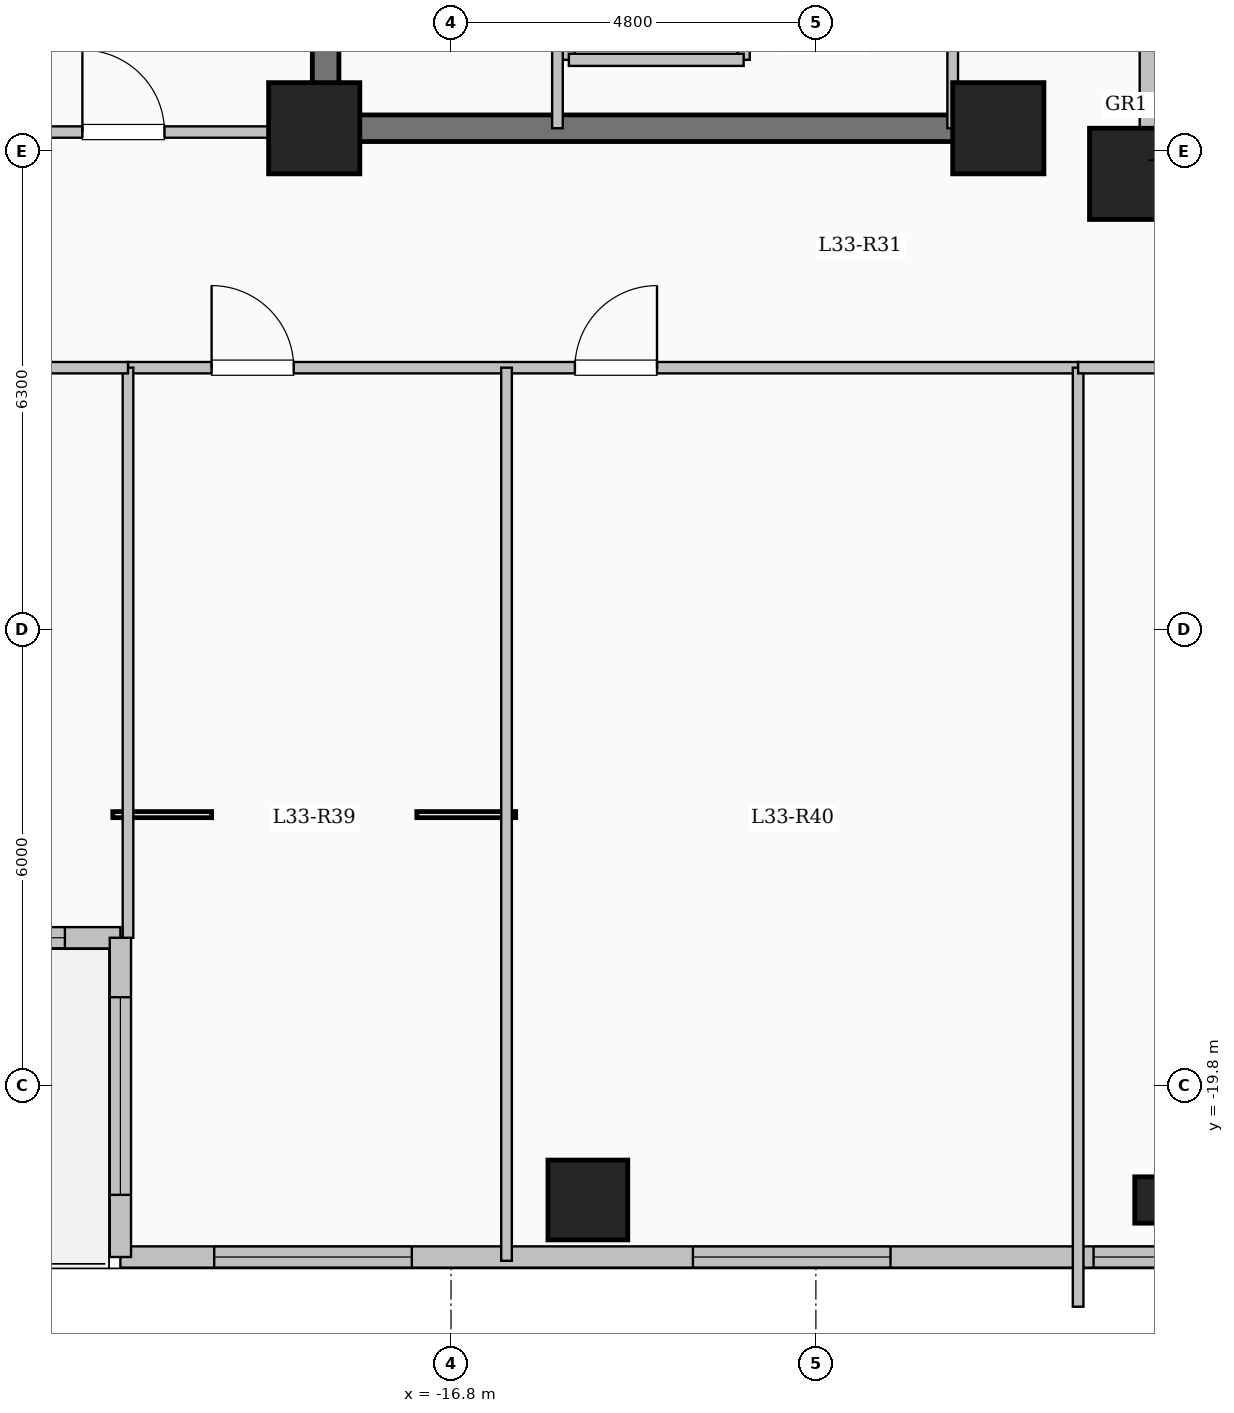
"""IFC4 building model, lengths in metres.
Left out: names, types, materials, properties, quantities, classifications, styles, units other than length and angle.
Written with IfcOpenShell. Run it as: python <this file> out.ifc"""

import sys

from ifc_helpers import new_model, si_unit, direction, frame, frame_2d, origin, origin_2d, place, context, subcontext, project, spatial, rectangle, hollow_circle, extrude, element, fill, save


model = new_model("IFC4")
c1 = context("Model", 3, precision=1e-05, world=origin(), true_north=direction((0.0, 1.0)))
c2 = subcontext(c1, "Body", "Model", "MODEL_VIEW")
j1 = project(units=[si_unit("LENGTHUNIT", "METRE"), si_unit("PLANEANGLEUNIT", "RADIAN")], contexts=[c1])
p1 = place(None, origin())
s1 = spatial("IfcSite", under=j1, at=p1, CompositionType="ELEMENT")
p2 = place(p1, origin())
s2 = spatial("IfcBuilding", under=s1, at=p2, CompositionType="ELEMENT")
p3 = place(p2, frame((0.0, 0.0, 123.0)))
s3 = spatial("IfcBuildingStorey", under=s2, at=p3, CompositionType="ELEMENT", Elevation=123.0)
for number, where, z_axis, x_axis in (
    (1, (-7.8, -7.8, 0.0), (0.0, 0.0, 1.0), (1.0, 0.0, 0.0)),
    (2, (-9.6, -7.2, 0.0), (0.0, 0.0, 1.0), (1.0, 0.0, 0.0)),
    (3, (-18.6, -7.2, 0.0), (0.0, 0.0, 1.0), (1.0, 0.0, 0.0)),
):
    element("IfcColumn", number, at=place(p3, frame(where, z_axis=z_axis, x_axis=x_axis)), inside=s3, PredefinedType="COLUMN", context=c2, shape_type="SweptSolid", body=[
        extrude(rectangle(XDim=1.2, YDim=1.2, at=origin_2d()), origin(), (0.0, 0.0, 1.0), 4.5),
    ])
p4 = place(p3, frame((-15.0, -21.3, 0.0), z_axis=(0.0, 0.0, 1.0), x_axis=(1.0, 0.0, 0.0)))
e4 = element("IfcColumn", 4, at=p4, inside=s3, PredefinedType="COLUMN", context=c2, shape_type="SweptSolid", body=[
    extrude(rectangle(XDim=1.05, YDim=1.05, at=origin_2d()), origin(), (0.0, 0.0, 1.0), 4.5),
])
p5 = place(p3, frame((-7.5, -21.3, 0.0), z_axis=(0.0, 0.0, 1.0), x_axis=(1.0, 0.0, 0.0)))
e5 = element("IfcColumn", 5, at=p5, inside=s3, PredefinedType="COLUMN", context=c2, shape_type="SweptSolid", body=[
    extrude(hollow_circle(Radius=0.305, WallThickness=0.025, at=origin_2d()), origin(), (0.0, 0.0, 1.0), 4.5),
])
p6 = place(p3, frame((-7.62, 7.62, 0.0), z_axis=(0.0, 0.0, 1.0), x_axis=(0.0, -1.0, 0.0)))
e6 = element("IfcWall", 6, at=p6, inside=s3, PredefinedType="SOLIDWALL", context=c2, shape_type="SweptSolid", body=[
    extrude(rectangle(XDim=15.24, YDim=0.24, at=frame_2d((7.62, 0.0))), origin(), (0.0, 0.0, 1.0), 4.2),
])
p7 = place(p6, frame((6.92, 0.0, 0.95)))
e7 = element("IfcOpeningElement", 7, at=p7, cuts=e6, PredefinedType="OPENING", context=c2, shape_type="SweptSolid", body=[
    extrude(rectangle(XDim=1.4, YDim=1.5, at=frame_2d((0.7, 0.75))), frame((0.0, 0.13, 0.0), z_axis=(0.0, -1.0, 0.0), x_axis=(1.0, 0.0, 0.0)), (0.0, 0.0, 1.0), 0.26),
])
p8 = place(p3, frame((-21.15, -17.85, 0.0), z_axis=(0.0, 0.0, 1.0), x_axis=(-1.0, 0.0, 0.0)))
e8 = element("IfcWall", 8, at=p8, inside=s3, PredefinedType="SOLIDWALL", context=c2, shape_type="SweptSolid", body=[
    extrude(rectangle(XDim=5.7, YDim=0.28, at=frame_2d((2.85, 0.0))), origin(), (0.0, 0.0, 1.0), 4.2),
])
p9 = place(p8, frame((2.5, 0.0, 0.0)))
e9 = element("IfcOpeningElement", 9, at=p9, cuts=e8, PredefinedType="OPENING", context=c2, shape_type="SweptSolid", body=[
    extrude(rectangle(XDim=1.1, YDim=2.2, at=frame_2d((0.55, 1.1))), frame((0.0, 0.15, 0.0), z_axis=(0.0, -1.0, 0.0), x_axis=(1.0, 0.0, 0.0)), (0.0, 0.0, 1.0), 0.3),
])
p10 = place(p8, frame((0.73, 0.0, 0.95)))
e10 = element("IfcOpeningElement", 10, at=p10, cuts=e8, PredefinedType="OPENING", context=c2, shape_type="SweptSolid", body=[
    extrude(rectangle(XDim=1.2, YDim=1.5, at=frame_2d((0.6, 0.75))), frame((0.0, 0.15, 0.0), z_axis=(0.0, -1.0, 0.0), x_axis=(1.0, 0.0, 0.0)), (0.0, 0.0, 1.0), 0.3),
])
p11 = place(p3, frame((-7.35, -22.05, 0.0), z_axis=(0.0, 0.0, 1.0), x_axis=(-1.0, 0.0, 0.0)))
e11 = element("IfcWall", 11, at=p11, inside=s3, PredefinedType="SOLIDWALL", context=c2, shape_type="SweptSolid", body=[
    extrude(rectangle(XDim=13.8, YDim=0.28, at=frame_2d((6.9, 0.0))), origin(), (0.0, 0.0, 1.0), 4.2),
])
p12 = place(p11, frame((0.147, 0.0, 0.95)))
e12 = element("IfcOpeningElement", 12, at=p12, cuts=e11, PredefinedType="OPENING", context=c2, shape_type="SweptSolid", body=[
    extrude(rectangle(XDim=0.85, YDim=1.5, at=frame_2d((0.425, 0.75))), frame((0.0, 0.15, 0.0), z_axis=(0.0, -1.0, 0.0), x_axis=(1.0, 0.0, 0.0)), (0.0, 0.0, 1.0), 0.3),
])
p13 = place(p11, frame((3.668, 0.0, 0.85)))
e13 = element("IfcOpeningElement", 13, at=p13, cuts=e11, PredefinedType="OPENING", context=c2, shape_type="SweptSolid", body=[
    extrude(rectangle(XDim=2.6, YDim=2.4, at=frame_2d((1.3, 1.2))), frame((0.0, 0.15, 0.0), z_axis=(0.0, -1.0, 0.0), x_axis=(1.0, 0.0, 0.0)), (0.0, 0.0, 1.0), 0.3),
])
p14 = place(p11, frame((9.966, 0.0, 0.85)))
e14 = element("IfcOpeningElement", 14, at=p14, cuts=e11, PredefinedType="OPENING", context=c2, shape_type="SweptSolid", body=[
    extrude(rectangle(XDim=2.6, YDim=2.4, at=frame_2d((1.3, 1.2))), frame((0.0, 0.15, 0.0), z_axis=(0.0, -1.0, 0.0), x_axis=(1.0, 0.0, 0.0)), (0.0, 0.0, 1.0), 0.3),
])
p15 = place(p3, frame((-21.15, -22.05, 0.0), z_axis=(0.0, 0.0, 1.0), x_axis=(0.0, 1.0, 0.0)))
e15 = element("IfcWall", 15, at=p15, inside=s3, PredefinedType="SOLIDWALL", context=c2, shape_type="SweptSolid", body=[
    extrude(rectangle(XDim=4.2, YDim=0.28, at=frame_2d((2.1, 0.0))), origin(), (0.0, 0.0, 1.0), 4.2),
])
p16 = place(p15, frame((0.818, 0.0, 0.85)))
e16 = element("IfcOpeningElement", 16, at=p16, cuts=e15, PredefinedType="OPENING", context=c2, shape_type="SweptSolid", body=[
    extrude(rectangle(XDim=2.6, YDim=2.4, at=frame_2d((1.3, 1.2))), frame((0.0, 0.15, 0.0), z_axis=(0.0, -1.0, 0.0), x_axis=(1.0, 0.0, 0.0)), (0.0, 0.0, 1.0), 0.3),
])
for number, where, z_axis, x_axis in (
    (17, (-15.25, -6.3, 0.0), (0.0, 0.0, 1.0), (0.0, 1.0, 0.0)),
    (18, (-12.95, -6.3, 0.0), (0.0, 0.0, 1.0), (0.0, 1.0, 0.0)),
):
    element("IfcWall", number, at=place(p3, frame(where, z_axis=z_axis, x_axis=x_axis)), inside=s3, PredefinedType="SOLIDWALL", context=c2, shape_type="SweptSolid", body=[
        extrude(rectangle(XDim=2.6, YDim=0.16, at=frame_2d((1.3, 0.0))), origin(), (0.0, 0.0, 1.0), 4.2),
    ])
p17 = place(p3, frame((-15.25, -6.3, 0.0), z_axis=(0.0, 0.0, 1.0), x_axis=(1.0, 0.0, 0.0)))
e19 = element("IfcWall", 19, at=p17, inside=s3, PredefinedType="SOLIDWALL", context=c2, shape_type="SweptSolid", body=[
    extrude(rectangle(XDim=2.3, YDim=0.16, at=frame_2d((1.15, 0.0))), origin(), (0.0, 0.0, 1.0), 4.2),
])
p18 = place(p3, frame((-18.45, -7.375, 0.0), z_axis=(0.0, 0.0, 1.0), x_axis=(0.0, 1.0, 0.0)))
e20 = element("IfcWall", 20, at=p18, inside=s3, PredefinedType="SHEAR", context=c2, shape_type="SweptSolid", body=[
    extrude(rectangle(XDim=14.05, YDim=0.35, at=frame_2d((7.025, 0.0))), origin(), (0.0, 0.0, 1.0), 4.5),
])
p19 = place(p3, frame((-18.625, -7.2, 0.0), z_axis=(0.0, 0.0, 1.0), x_axis=(1.0, 0.0, 0.0)))
e21 = element("IfcWall", 21, at=p19, inside=s3, PredefinedType="SHEAR", context=c2, shape_type="SweptSolid", body=[
    extrude(rectangle(XDim=8.55, YDim=0.35, at=frame_2d((4.275, 0.0))), origin(), (0.0, 0.0, 1.0), 4.5),
])
p20 = place(p3, frame((-15.4, -7.2, 0.0), z_axis=(0.0, 0.0, 1.0), x_axis=(0.0, 1.0, 0.0)))
e22 = element("IfcWall", 22, at=p20, inside=s3, PredefinedType="PARTITIONING", context=c2, shape_type="SweptSolid", body=[
    extrude(rectangle(XDim=10.45, YDim=0.14, at=frame_2d((5.225, 0.0))), origin(), (0.0, 0.0, 1.0), 4.2),
])
p21 = place(p20, frame((9.25, 0.0, 0.0)))
e23 = element("IfcOpeningElement", 23, at=p21, cuts=e22, PredefinedType="OPENING", context=c2, shape_type="SweptSolid", body=[
    extrude(rectangle(XDim=0.9, YDim=2.08, at=frame_2d((0.45, 1.04))), frame((0.0, 0.08, 0.0), z_axis=(0.0, -1.0, 0.0), x_axis=(1.0, 0.0, 0.0)), (0.0, 0.0, 1.0), 0.16),
])
p22 = place(p3, frame((-10.2, -7.2, 0.0), z_axis=(0.0, 0.0, 1.0), x_axis=(0.0, 1.0, 0.0)))
e24 = element("IfcWall", 24, at=p22, inside=s3, PredefinedType="PARTITIONING", context=c2, shape_type="SweptSolid", body=[
    extrude(rectangle(XDim=9.12, YDim=0.14, at=frame_2d((4.56, 0.0))), origin(), (0.0, 0.0, 1.0), 4.2),
])
p23 = place(p22, frame((1.9, 0.0, 0.0)))
e25 = element("IfcOpeningElement", 25, at=p23, cuts=e24, PredefinedType="OPENING", context=c2, shape_type="SweptSolid", body=[
    extrude(rectangle(XDim=0.95, YDim=2.12, at=frame_2d((0.475, 1.06))), frame((0.0, 0.08, 0.0), z_axis=(0.0, -1.0, 0.0), x_axis=(1.0, 0.0, 0.0)), (0.0, 0.0, 1.0), 0.16),
])
p24 = place(p22, frame((5.0, 0.0, 0.0)))
e26 = element("IfcOpeningElement", 26, at=p24, cuts=e24, PredefinedType="OPENING", context=c2, shape_type="SweptSolid", body=[
    extrude(rectangle(XDim=0.95, YDim=2.12, at=frame_2d((0.475, 1.06))), frame((0.0, 0.08, 0.0), z_axis=(0.0, -1.0, 0.0), x_axis=(1.0, 0.0, 0.0)), (0.0, 0.0, 1.0), 0.16),
])
p25 = place(p3, frame((-21.05, -10.35, 0.0), z_axis=(0.0, 0.0, 1.0), x_axis=(1.0, 0.0, 0.0)))
e27 = element("IfcWall", 27, at=p25, inside=s3, PredefinedType="PARTITIONING", context=c2, shape_type="SweptSolid", body=[
    extrude(rectangle(XDim=12.5, YDim=0.15, at=frame_2d((6.25, 0.0))), origin(), (0.0, 0.0, 1.0), 4.2),
])
p26 = place(p25, frame((1.1, 0.0, 0.0)))
e28 = element("IfcOpeningElement", 28, at=p26, cuts=e27, PredefinedType="OPENING", context=c2, shape_type="SweptSolid", body=[
    extrude(rectangle(XDim=1.08, YDim=2.15, at=frame_2d((0.54, 1.075))), frame((0.0, 0.085, 0.0), z_axis=(0.0, -1.0, 0.0), x_axis=(1.0, 0.0, 0.0)), (0.0, 0.0, 1.0), 0.17),
])
p27 = place(p25, frame((5.88, 0.0, 0.0)))
e29 = element("IfcOpeningElement", 29, at=p27, cuts=e27, PredefinedType="OPENING", context=c2, shape_type="SweptSolid", body=[
    extrude(rectangle(XDim=1.08, YDim=2.15, at=frame_2d((0.54, 1.075))), frame((0.0, 0.085, 0.0), z_axis=(0.0, -1.0, 0.0), x_axis=(1.0, 0.0, 0.0)), (0.0, 0.0, 1.0), 0.17),
])
p28 = place(p3, frame((-16.07, -22.1, 0.0), z_axis=(0.0, 0.0, 1.0), x_axis=(0.0, 1.0, 0.0)))
e30 = element("IfcWall", 30, at=p28, inside=s3, PredefinedType="PARTITIONING", context=c2, shape_type="SweptSolid", body=[
    extrude(rectangle(XDim=11.75, YDim=0.14, at=frame_2d((5.875, 0.0))), origin(), (0.0, 0.0, 1.0), 4.2),
])
p29 = place(p3, frame((-8.55, -22.704, 0.0), z_axis=(0.0, 0.0, 1.0), x_axis=(0.0, 1.0, 0.0)))
e31 = element("IfcWall", 31, at=p29, inside=s3, PredefinedType="PARTITIONING", context=c2, shape_type="SweptSolid", body=[
    extrude(rectangle(XDim=12.354, YDim=0.14, at=frame_2d((6.177, 0.0))), origin(), (0.0, 0.0, 1.0), 4.2),
])
p30 = place(p3, frame((-8.55, -10.35, 0.0), z_axis=(0.0, 0.0, 1.0), x_axis=(1.0, 0.0, 0.0)))
e32 = element("IfcWall", 32, at=p30, inside=s3, PredefinedType="PARTITIONING", context=c2, shape_type="SweptSolid", body=[
    extrude(rectangle(XDim=17.1, YDim=0.15, at=frame_2d((8.55, 0.0))), origin(), (0.0, 0.0, 1.0), 4.2),
])
p31 = place(p30, frame((1.4, 0.0, 0.0)))
e33 = element("IfcOpeningElement", 33, at=p31, cuts=e32, PredefinedType="OPENING", context=c2, shape_type="SweptSolid", body=[
    extrude(rectangle(XDim=1.08, YDim=2.15, at=frame_2d((0.54, 1.075))), frame((0.0, 0.085, 0.0), z_axis=(0.0, -1.0, 0.0), x_axis=(1.0, 0.0, 0.0)), (0.0, 0.0, 1.0), 0.17),
])
p32 = place(p30, frame((10.5, 0.0, 0.0)))
e34 = element("IfcOpeningElement", 34, at=p32, cuts=e32, PredefinedType="OPENING", context=c2, shape_type="SweptSolid", body=[
    extrude(rectangle(XDim=1.08, YDim=2.15, at=frame_2d((0.54, 1.075))), frame((0.0, 0.085, 0.0), z_axis=(0.0, -1.0, 0.0), x_axis=(1.0, 0.0, 0.0)), (0.0, 0.0, 1.0), 0.17),
])
p33 = place(p3, frame((-26.88, -7.25, 0.0), z_axis=(0.0, 0.0, 1.0), x_axis=(1.0, 0.0, 0.0)))
e35 = element("IfcWall", 35, at=p33, inside=s3, PredefinedType="PARTITIONING", context=c2, shape_type="SweptSolid", body=[
    extrude(rectangle(XDim=8.43, YDim=0.15, at=frame_2d((4.215, 0.0))), origin(), (0.0, 0.0, 1.0), 4.2),
])
p34 = place(p33, frame((5.23, 0.0, 0.0)))
e36 = element("IfcOpeningElement", 36, at=p34, cuts=e35, PredefinedType="OPENING", context=c2, shape_type="SweptSolid", body=[
    extrude(rectangle(XDim=1.08, YDim=2.15, at=frame_2d((0.54, 1.075))), frame((0.0, 0.085, 0.0), z_axis=(0.0, -1.0, 0.0), x_axis=(1.0, 0.0, 0.0)), (0.0, 0.0, 1.0), 0.17),
])
p35 = place(p3, frame((-21.05, -17.85, 0.0), z_axis=(0.0, 0.0, 1.0), x_axis=(0.0, 1.0, 0.0)))
e37 = element("IfcWall", 37, at=p35, inside=s3, PredefinedType="PARTITIONING", context=c2, shape_type="SweptSolid", body=[
    extrude(rectangle(XDim=7.5, YDim=0.14, at=frame_2d((3.75, 0.0))), origin(), (0.0, 0.0, 1.0), 4.2),
])
p36 = place(p3, frame((-26.88, -10.35, 0.0), z_axis=(0.0, 0.0, 1.0), x_axis=(1.0, 0.0, 0.0)))
e38 = element("IfcWall", 38, at=p36, inside=s3, PredefinedType="PARTITIONING", context=c2, shape_type="SweptSolid", body=[
    extrude(rectangle(XDim=5.83, YDim=0.15, at=frame_2d((2.915, 0.0))), origin(), (0.0, 0.0, 1.0), 4.2),
])
p37 = place(p36, frame((2.44, 0.0, 0.0)))
e39 = element("IfcOpeningElement", 39, at=p37, cuts=e38, PredefinedType="OPENING", context=c2, shape_type="SweptSolid", body=[
    extrude(rectangle(XDim=0.95, YDim=2.15, at=frame_2d((0.475, 1.075))), frame((0.0, 0.085, 0.0), z_axis=(0.0, -1.0, 0.0), x_axis=(1.0, 0.0, 0.0)), (0.0, 0.0, 1.0), 0.17),
])
p38 = place(p10, origin())
e40 = element("IfcWindow", 40, at=p38, inside=s3, PartitioningType="SINGLE_PANEL", PredefinedType="WINDOW", context=c2, shape_type="SweptSolid", body=[
    extrude(rectangle(XDim=1.2, YDim=1.5, at=frame_2d((0.6, 0.75))), frame((0.0, 0.03, 0.0), z_axis=(0.0, -1.0, 0.0), x_axis=(1.0, 0.0, 0.0)), (0.0, 0.0, 1.0), 0.06),
])
fill(e10, e40)
p39 = place(p12, origin())
e41 = element("IfcWindow", 41, at=p39, inside=s3, PartitioningType="SINGLE_PANEL", PredefinedType="WINDOW", context=c2, shape_type="SweptSolid", body=[
    extrude(rectangle(XDim=0.85, YDim=1.5, at=frame_2d((0.425, 0.75))), frame((0.0, 0.03, 0.0), z_axis=(0.0, -1.0, 0.0), x_axis=(1.0, 0.0, 0.0)), (0.0, 0.0, 1.0), 0.06),
])
fill(e12, e41)
p40 = place(p13, origin())
e42 = element("IfcWindow", 42, at=p40, inside=s3, PartitioningType="SINGLE_PANEL", PredefinedType="WINDOW", context=c2, shape_type="SweptSolid", body=[
    extrude(rectangle(XDim=2.6, YDim=2.4, at=frame_2d((1.3, 1.2))), frame((0.0, 0.03, 0.0), z_axis=(0.0, -1.0, 0.0), x_axis=(1.0, 0.0, 0.0)), (0.0, 0.0, 1.0), 0.06),
])
fill(e13, e42)
p41 = place(p14, origin())
e43 = element("IfcWindow", 43, at=p41, inside=s3, PartitioningType="SINGLE_PANEL", PredefinedType="WINDOW", context=c2, shape_type="SweptSolid", body=[
    extrude(rectangle(XDim=2.6, YDim=2.4, at=frame_2d((1.3, 1.2))), frame((0.0, 0.03, 0.0), z_axis=(0.0, -1.0, 0.0), x_axis=(1.0, 0.0, 0.0)), (0.0, 0.0, 1.0), 0.06),
])
fill(e14, e43)
p42 = place(p16, origin())
e44 = element("IfcWindow", 44, at=p42, inside=s3, PartitioningType="SINGLE_PANEL", PredefinedType="WINDOW", context=c2, shape_type="SweptSolid", body=[
    extrude(rectangle(XDim=2.6, YDim=2.4, at=frame_2d((1.3, 1.2))), frame((0.0, 0.03, 0.0), z_axis=(0.0, -1.0, 0.0), x_axis=(1.0, 0.0, 0.0)), (0.0, 0.0, 1.0), 0.06),
])
fill(e16, e44)
p43 = place(p26, origin())
e45 = element("IfcDoor", 45, at=p43, inside=s3, OperationType="SINGLE_SWING_LEFT", PredefinedType="DOOR", context=c2, shape_type="SweptSolid", body=[
    extrude(rectangle(XDim=1.08, YDim=2.15, at=frame_2d((0.54, 1.075))), frame((0.0, 0.025, 0.0), z_axis=(0.0, -1.0, 0.0), x_axis=(1.0, 0.0, 0.0)), (0.0, 0.0, 1.0), 0.05),
])
fill(e28, e45)
p44 = place(p27, origin())
e46 = element("IfcDoor", 46, at=p44, inside=s3, OperationType="SINGLE_SWING_RIGHT", PredefinedType="DOOR", context=c2, shape_type="SweptSolid", body=[
    extrude(rectangle(XDim=1.08, YDim=2.15, at=frame_2d((0.54, 1.075))), frame((0.0, 0.025, 0.0), z_axis=(0.0, -1.0, 0.0), x_axis=(1.0, 0.0, 0.0)), (0.0, 0.0, 1.0), 0.05),
])
fill(e29, e46)
p45 = place(p34, origin())
e47 = element("IfcDoor", 47, at=p45, inside=s3, OperationType="SINGLE_SWING_LEFT", PredefinedType="DOOR", context=c2, shape_type="SweptSolid", body=[
    extrude(rectangle(XDim=1.08, YDim=2.15, at=frame_2d((0.54, 1.075))), frame((0.0, 0.025, 0.0), z_axis=(0.0, -1.0, 0.0), x_axis=(1.0, 0.0, 0.0)), (0.0, 0.0, 1.0), 0.05),
])
fill(e36, e47)
save(model, sys.argv[1])
